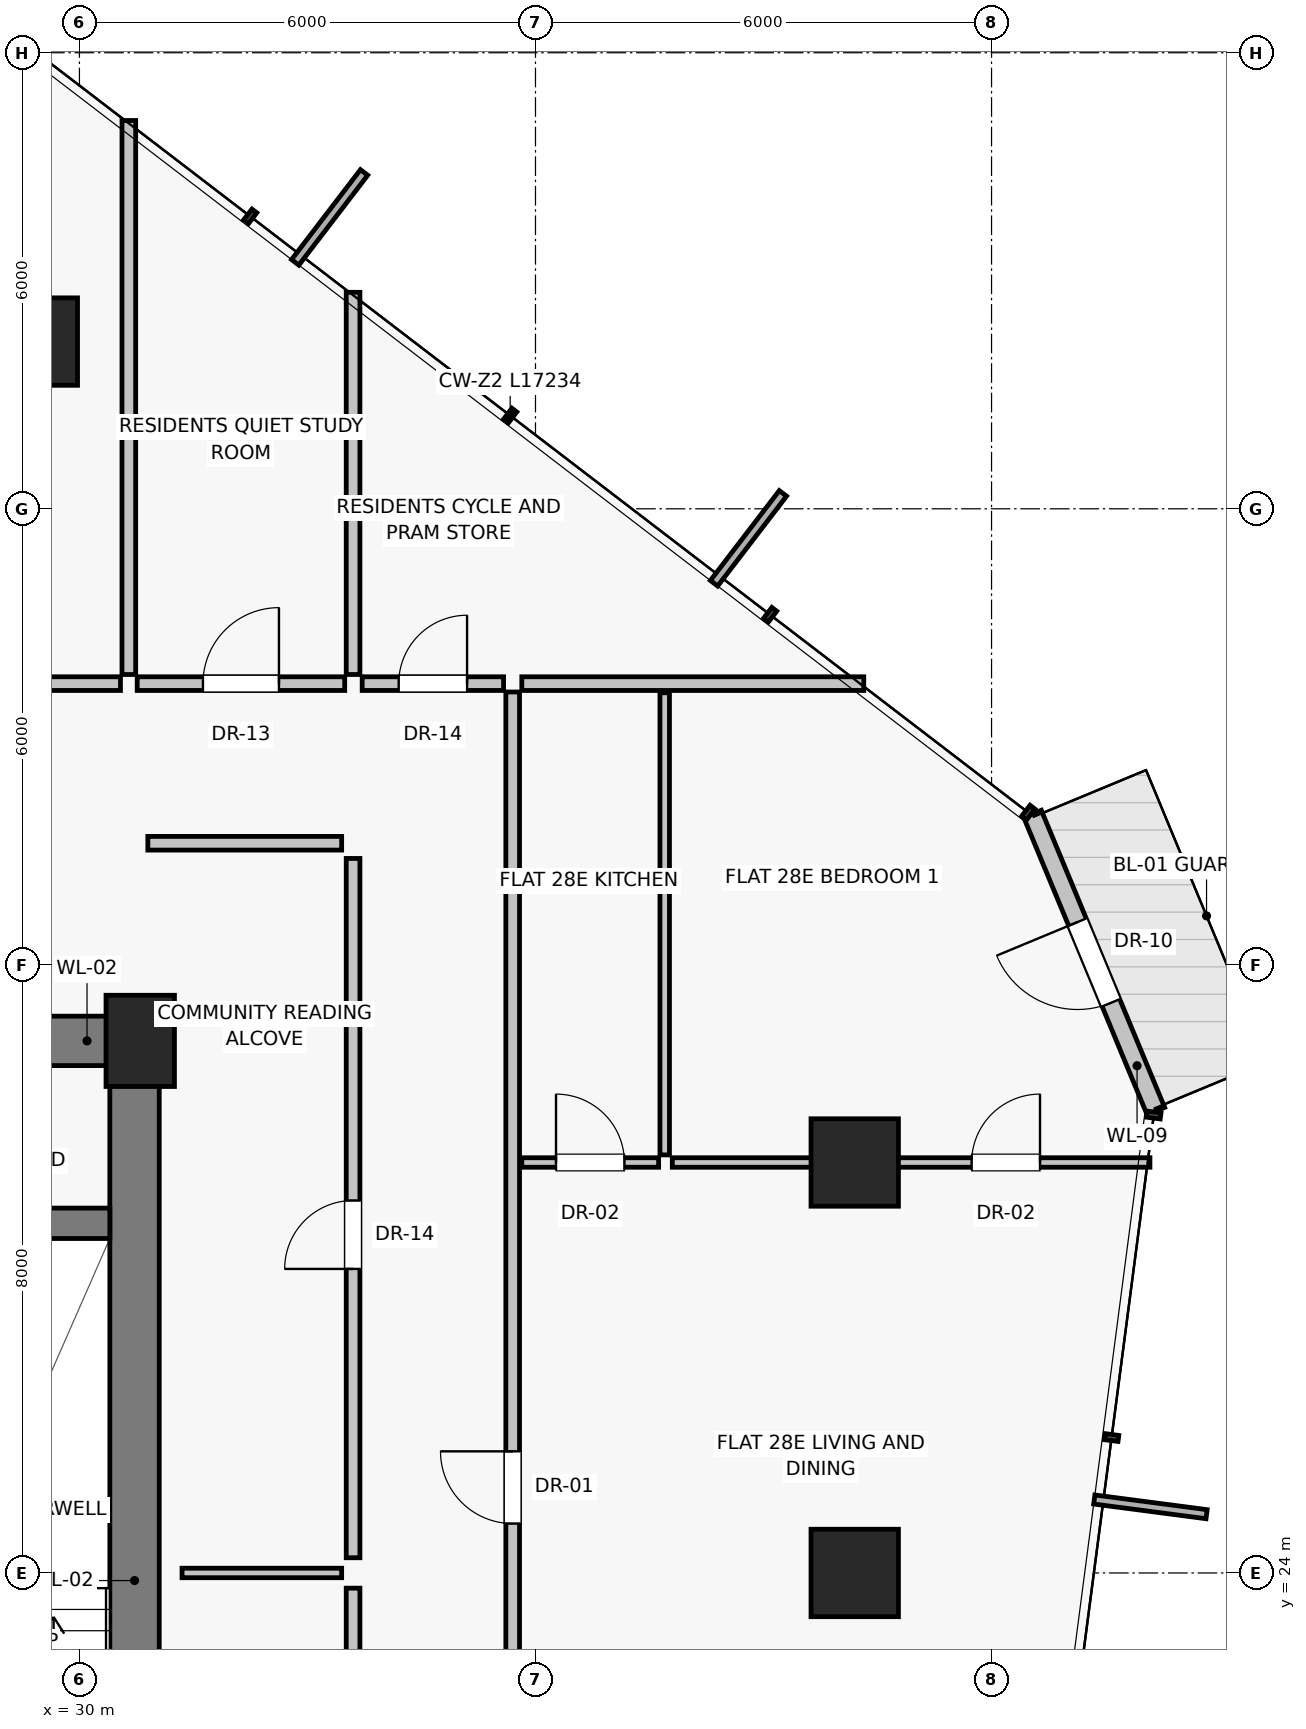
"""IFC4 building model, lengths in metres.
Left out: names, types, materials, properties, quantities, classifications, styles, units other than length and angle.
Written with IfcOpenShell. Run it as: python <this file> out.ifc"""

import sys

from ifc_helpers import new_model, si_unit, direction, frame, frame_2d, origin, origin_2d, place, context, subcontext, project, spatial, rectangle, extrude, source, transform, mapped, element, fill, save


model = new_model("IFC4")
c1 = context("Model", 3, precision=1e-05, world=origin(), true_north=direction((0.0, 1.0)))
c2 = subcontext(c1, "Body", "Model", "MODEL_VIEW")
j1 = project(units=[si_unit("LENGTHUNIT", "METRE"), si_unit("PLANEANGLEUNIT", "RADIAN")], contexts=[c1])
p1 = place(None, origin())
s1 = spatial("IfcSite", under=j1, at=p1, CompositionType="ELEMENT")
p2 = place(p1, origin())
s2 = spatial("IfcBuilding", under=s1, at=p2, CompositionType="ELEMENT")
p3 = place(p2, frame((0.0, 0.0, 102.45)))
s3 = spatial("IfcBuildingStorey", under=s2, at=p3, CompositionType="ELEMENT", Elevation=102.45)
p4 = place(p3, frame((30.8, 31.0, 0.0), z_axis=(0.0, 0.0, 1.0), x_axis=(1.0, 0.0, 0.0)))
e1 = element("IfcColumn", 1, at=p4, inside=s3, PredefinedType="PILASTER", context=c2, shape_type="SweptSolid", body=[
    extrude(rectangle(XDim=0.9, YDim=1.2, at=origin_2d()), origin(), (0.0, 0.0, 1.0), 3.25),
])
for number, where, z_axis, x_axis in (
    (2, (40.2, 24.0, 0.0), (0.0, 0.0, 1.0), (1.0, 0.0, 0.0)),
    (3, (40.2, 29.4, 0.0), (0.0, 0.0, 1.0), (1.0, 0.0, 0.0)),
    (4, (29.4, 40.2, 0.0), (0.0, 0.0, 1.0), (1.0, 0.0, 0.0)),
):
    element("IfcColumn", number, at=place(p3, frame(where, z_axis=z_axis, x_axis=x_axis)), inside=s3, PredefinedType="COLUMN", context=c2, shape_type="SweptSolid", body=[
        extrude(rectangle(XDim=1.15, YDim=1.15, at=origin_2d()), origin(), (0.0, 0.0, 1.0), 3.25),
    ])
p5 = place(p3, frame((44.162, 30.076, 0.0), z_axis=(0.0, 0.0, 1.0), x_axis=(-0.383361891247, 0.923598213694, 0.0)))
e5 = element("IfcWall", 5, at=p5, inside=s3, PredefinedType="SOLIDWALL", context=c2, shape_type="SweptSolid", body=[
    extrude(rectangle(XDim=4.233, YDim=0.25, at=frame_2d((2.117, 0.0))), origin(), (0.0, 0.0, 1.0), 3.0),
])
p6 = place(p5, frame((1.542, 0.0, 0.0)))
e6 = element("IfcOpeningElement", 6, at=p6, cuts=e5, PredefinedType="OPENING", context=c2, shape_type="SweptSolid", body=[
    extrude(rectangle(XDim=1.15, YDim=2.25, at=frame_2d((0.575, 1.125))), frame((0.0, 0.135, 0.0), z_axis=(0.0, -1.0, 0.0), x_axis=(1.0, 0.0, 0.0)), (0.0, 0.0, 1.0), 0.27),
])
p7 = place(p3, frame((30.725, 16.8, 0.0), z_axis=(0.0, 0.0, 1.0), x_axis=(0.0, 1.0, 0.0)))
e7 = element("IfcWall", 7, at=p7, inside=s3, PredefinedType="SHEAR", context=c2, shape_type="SweptSolid", body=[
    extrude(rectangle(XDim=14.2, YDim=0.65, at=frame_2d((7.1, 0.0))), origin(), (0.0, 0.0, 1.0), 3.0),
])
p8 = place(p3, frame((27.0, 31.0, 0.0), z_axis=(0.0, 0.0, 1.0), x_axis=(1.0, 0.0, 0.0)))
e8 = element("IfcWall", 8, at=p8, inside=s3, PredefinedType="SHEAR", context=c2, shape_type="SweptSolid", body=[
    extrude(rectangle(XDim=3.8, YDim=0.65, at=frame_2d((1.9, 0.0))), origin(), (0.0, 0.0, 1.0), 3.0),
])
p9 = place(p8, frame((1.15, 0.0, 0.0)))
e9 = element("IfcOpeningElement", 9, at=p9, cuts=e8, PredefinedType="OPENING", context=c2, shape_type="SweptSolid", body=[
    extrude(rectangle(XDim=1.0, YDim=2.01, at=frame_2d((0.5, 1.005))), frame((0.0, 0.335, 0.0), z_axis=(0.0, -1.0, 0.0), x_axis=(1.0, 0.0, 0.0)), (0.0, 0.0, 1.0), 0.67),
])
p10 = place(p3, frame((27.0, 28.6, 0.0), z_axis=(0.0, 0.0, 1.0), x_axis=(1.0, 0.0, 0.0)))
e10 = element("IfcWall", 10, at=p10, inside=s3, PredefinedType="SHEAR", context=c2, shape_type="SweptSolid", body=[
    extrude(rectangle(XDim=3.4, YDim=0.4, at=frame_2d((1.7, 0.0))), origin(), (0.0, 0.0, 1.0), 3.0),
])
p11 = place(p3, frame((33.6, 14.4, 0.0), z_axis=(0.0, 0.0, 1.0), x_axis=(0.0, 1.0, 0.0)))
e11 = element("IfcWall", 11, at=p11, inside=s3, PredefinedType="PARTITIONING", context=c2, shape_type="SweptSolid", body=[
    extrude(rectangle(XDim=9.4, YDim=0.18, at=frame_2d((4.7, 0.0))), origin(), (0.0, 0.0, 1.0), 3.0),
])
p12 = place(p11, frame((3.8, 0.0, 0.0)))
e12 = element("IfcOpeningElement", 12, at=p12, cuts=e11, PredefinedType="OPENING", context=c2, shape_type="SweptSolid", body=[
    extrude(rectangle(XDim=0.9, YDim=2.01, at=frame_2d((0.45, 1.005))), frame((0.0, 0.1, 0.0), z_axis=(0.0, -1.0, 0.0), x_axis=(1.0, 0.0, 0.0)), (0.0, 0.0, 1.0), 0.2),
])
p13 = place(p3, frame((33.6, 24.2, 0.0), z_axis=(0.0, 0.0, 1.0), x_axis=(0.0, 1.0, 0.0)))
e13 = element("IfcWall", 13, at=p13, inside=s3, PredefinedType="PARTITIONING", context=c2, shape_type="SweptSolid", body=[
    extrude(rectangle(XDim=9.2, YDim=0.18, at=frame_2d((4.6, 0.0))), origin(), (0.0, 0.0, 1.0), 3.0),
])
p14 = place(p13, frame((3.8, 0.0, 0.0)))
e14 = element("IfcOpeningElement", 14, at=p14, cuts=e13, PredefinedType="OPENING", context=c2, shape_type="SweptSolid", body=[
    extrude(rectangle(XDim=0.9, YDim=2.01, at=frame_2d((0.45, 1.005))), frame((0.0, 0.1, 0.0), z_axis=(0.0, -1.0, 0.0), x_axis=(1.0, 0.0, 0.0)), (0.0, 0.0, 1.0), 0.2),
])
p15 = place(p3, frame((31.35, 24.0, 0.0), z_axis=(0.0, 0.0, 1.0), x_axis=(1.0, 0.0, 0.0)))
e15 = element("IfcWall", 15, at=p15, inside=s3, PredefinedType="PARTITIONING", context=c2, shape_type="SweptSolid", body=[
    extrude(rectangle(XDim=2.1, YDim=0.125, at=frame_2d((1.05, 0.0))), origin(), (0.0, 0.0, 1.0), 3.0),
])
p16 = place(p3, frame((30.9, 33.6, 0.0), z_axis=(0.0, 0.0, 1.0), x_axis=(1.0, 0.0, 0.0)))
e16 = element("IfcWall", 16, at=p16, inside=s3, PredefinedType="PARTITIONING", context=c2, shape_type="SweptSolid", body=[
    extrude(rectangle(XDim=2.55, YDim=0.18, at=frame_2d((1.275, 0.0))), origin(), (0.0, 0.0, 1.0), 3.0),
])
p17 = place(p3, frame((33.6, 35.82, 0.0), z_axis=(0.0, 0.0, 1.0), x_axis=(0.0, 1.0, 0.0)))
e17 = element("IfcWall", 17, at=p17, inside=s3, PredefinedType="PARTITIONING", context=c2, shape_type="SweptSolid", body=[
    extrude(rectangle(XDim=5.028, YDim=0.18, at=frame_2d((2.514, 0.0))), origin(), (0.0, 0.0, 1.0), 3.0),
])
p18 = place(p3, frame((30.76, 35.7, 0.0), z_axis=(0.0, 0.0, 1.0), x_axis=(1.0, 0.0, 0.0)))
e18 = element("IfcWall", 18, at=p18, inside=s3, PredefinedType="PARTITIONING", context=c2, shape_type="SweptSolid", body=[
    extrude(rectangle(XDim=2.73, YDim=0.18, at=frame_2d((1.365, 0.0))), origin(), (0.0, 0.0, 1.0), 3.0),
])
p19 = place(p18, frame((0.865, 0.0, 0.0)))
e19 = element("IfcOpeningElement", 19, at=p19, cuts=e18, PredefinedType="OPENING", context=c2, shape_type="SweptSolid", body=[
    extrude(rectangle(XDim=1.0, YDim=2.01, at=frame_2d((0.5, 1.005))), frame((0.0, 0.1, 0.0), z_axis=(0.0, -1.0, 0.0), x_axis=(1.0, 0.0, 0.0)), (0.0, 0.0, 1.0), 0.2),
])
p20 = place(p3, frame((30.65, 35.82, 0.0), z_axis=(0.0, 0.0, 1.0), x_axis=(0.0, 1.0, 0.0)))
e20 = element("IfcWall", 20, at=p20, inside=s3, PredefinedType="PARTITIONING", context=c2, shape_type="SweptSolid", body=[
    extrude(rectangle(XDim=7.288, YDim=0.18, at=frame_2d((3.644, 0.0))), origin(), (0.0, 0.0, 1.0), 3.0),
])
p21 = place(p3, frame((25.366, 35.7, 0.0), z_axis=(0.0, 0.0, 1.0), x_axis=(1.0, 0.0, 0.0)))
e21 = element("IfcWall", 21, at=p21, inside=s3, PredefinedType="PARTITIONING", context=c2, shape_type="SweptSolid", body=[
    extrude(rectangle(XDim=5.174, YDim=0.18, at=frame_2d((2.587, 0.0))), origin(), (0.0, 0.0, 1.0), 2.58),
])
p22 = place(p21, frame((3.03, 0.0, 0.0)))
e22 = element("IfcOpeningElement", 22, at=p22, cuts=e21, PredefinedType="OPENING", context=c2, shape_type="SweptSolid", body=[
    extrude(rectangle(XDim=0.95, YDim=2.02, at=frame_2d((0.475, 1.01))), frame((0.0, 0.1, 0.0), z_axis=(0.0, -1.0, 0.0), x_axis=(1.0, 0.0, 0.0)), (0.0, 0.0, 1.0), 0.2),
])
p23 = place(p3, frame((35.82, 35.7, 0.0), z_axis=(0.0, 0.0, 1.0), x_axis=(1.0, 0.0, 0.0)))
e23 = element("IfcWall", 23, at=p23, inside=s3, PredefinedType="PARTITIONING", context=c2, shape_type="SweptSolid", body=[
    extrude(rectangle(XDim=4.499, YDim=0.18, at=frame_2d((2.25, 0.0))), origin(), (0.0, 0.0, 1.0), 3.0),
])
p24 = place(p3, frame((35.7, 18.71, 0.0), z_axis=(0.0, 0.0, 1.0), x_axis=(0.0, 1.0, 0.0)))
e24 = element("IfcWall", 24, at=p24, inside=s3, PredefinedType="PARTITIONING", context=c2, shape_type="SweptSolid", body=[
    extrude(rectangle(XDim=16.88, YDim=0.18, at=frame_2d((8.44, 0.0))), origin(), (0.0, 0.0, 1.0), 2.58),
])
p25 = place(p24, frame((5.94, 0.0, 0.0)))
e25 = element("IfcOpeningElement", 25, at=p25, cuts=e24, PredefinedType="OPENING", context=c2, shape_type="SweptSolid", body=[
    extrude(rectangle(XDim=0.95, YDim=2.02, at=frame_2d((0.475, 1.01))), frame((0.0, 0.1, 0.0), z_axis=(0.0, -1.0, 0.0), x_axis=(1.0, 0.0, 0.0)), (0.0, 0.0, 1.0), 0.2),
])
p26 = place(p3, frame((35.82, 29.4, 0.0), z_axis=(0.0, 0.0, 1.0), x_axis=(1.0, 0.0, 0.0)))
e26 = element("IfcWall", 26, at=p26, inside=s3, PredefinedType="PARTITIONING", context=c2, shape_type="SweptSolid", body=[
    extrude(rectangle(XDim=1.8, YDim=0.125, at=frame_2d((0.9, 0.0))), origin(), (0.0, 0.0, 1.0), 2.378),
])
p27 = place(p26, frame((0.45, 0.0, 0.0)))
e27 = element("IfcOpeningElement", 27, at=p27, cuts=e26, PredefinedType="OPENING", context=c2, shape_type="SweptSolid", body=[
    extrude(rectangle(XDim=0.9, YDim=2.01, at=frame_2d((0.45, 1.005))), frame((0.0, 0.073, 0.0), z_axis=(0.0, -1.0, 0.0), x_axis=(1.0, 0.0, 0.0)), (0.0, 0.0, 1.0), 0.145),
])
p28 = place(p3, frame((37.7, 29.5, 0.0), z_axis=(0.0, 0.0, 1.0), x_axis=(0.0, 1.0, 0.0)))
e28 = element("IfcWall", 28, at=p28, inside=s3, PredefinedType="PARTITIONING", context=c2, shape_type="SweptSolid", body=[
    extrude(rectangle(XDim=6.08, YDim=0.125, at=frame_2d((3.04, 0.0))), origin(), (0.0, 0.0, 1.0), 3.0),
])
p29 = place(p3, frame((37.8, 29.4, 0.0), z_axis=(0.0, 0.0, 1.0), x_axis=(1.0, 0.0, 0.0)))
e29 = element("IfcWall", 29, at=p29, inside=s3, PredefinedType="PARTITIONING", context=c2, shape_type="SweptSolid", body=[
    extrude(rectangle(XDim=6.283, YDim=0.125, at=frame_2d((3.142, 0.0))), origin(), (0.0, 0.0, 1.0), 2.378),
])
p30 = place(p29, frame((3.938, 0.0, 0.0)))
e30 = element("IfcOpeningElement", 30, at=p30, cuts=e29, PredefinedType="OPENING", context=c2, shape_type="SweptSolid", body=[
    extrude(rectangle(XDim=0.9, YDim=2.01, at=frame_2d((0.45, 1.005))), frame((0.0, 0.073, 0.0), z_axis=(0.0, -1.0, 0.0), x_axis=(1.0, 0.0, 0.0)), (0.0, 0.0, 1.0), 0.145),
])
p31 = place(p3, frame((33.72, 35.7, 0.0), z_axis=(0.0, 0.0, 1.0), x_axis=(1.0, 0.0, 0.0)))
e31 = element("IfcWall", 31, at=p31, inside=s3, PredefinedType="PARTITIONING", context=c2, shape_type="SweptSolid", body=[
    extrude(rectangle(XDim=1.86, YDim=0.18, at=frame_2d((0.93, 0.0))), origin(), (0.0, 0.0, 1.0), 3.0),
])
p32 = place(p31, frame((0.48, 0.0, 0.0)))
e32 = element("IfcOpeningElement", 32, at=p32, cuts=e31, PredefinedType="OPENING", context=c2, shape_type="SweptSolid", body=[
    extrude(rectangle(XDim=0.9, YDim=2.01, at=frame_2d((0.45, 1.005))), frame((0.0, 0.1, 0.0), z_axis=(0.0, -1.0, 0.0), x_axis=(1.0, 0.0, 0.0)), (0.0, 0.0, 1.0), 0.2),
])
m1 = source(origin(), c2, "Body", "SweptSolid", [
    extrude(rectangle(XDim=1.15, YDim=2.25, at=frame_2d((0.575, 1.125))), frame((0.0, 0.025, 0.0), z_axis=(0.0, -1.0, 0.0), x_axis=(1.0, 0.0, 0.0)), (0.0, 0.0, 1.0), 0.05),
])
p33 = place(p6, frame((1.15, 0.0, 0.0), z_axis=(0.0, 0.0, 1.0), x_axis=(-1.0, 0.0, 0.0)))
e33 = element("IfcDoor", 33, at=p33, inside=s3, OperationType="SINGLE_SWING_RIGHT", PredefinedType="DOOR", context=c2, shape_type="MappedRepresentation", body=[
    mapped(m1, transform((0.0, 0.0, 0.0), scale=1.0)),
])
fill(e6, e33)
m2 = source(origin(), c2, "Body", "SweptSolid", [
    extrude(rectangle(XDim=0.9, YDim=2.01, at=frame_2d((0.45, 1.005))), frame((0.0, 0.025, 0.0), z_axis=(0.0, -1.0, 0.0), x_axis=(1.0, 0.0, 0.0)), (0.0, 0.0, 1.0), 0.05),
])
p34 = place(p14, origin())
e34 = element("IfcDoor", 34, at=p34, inside=s3, OperationType="SINGLE_SWING_LEFT", PredefinedType="DOOR", context=c2, shape_type="MappedRepresentation", body=[
    mapped(m2, transform((0.0, 0.0, 0.0), scale=1.0)),
])
fill(e14, e34)
m3 = source(origin(), c2, "Body", "SweptSolid", [
    extrude(rectangle(XDim=1.0, YDim=2.01, at=frame_2d((0.5, 1.005))), frame((0.0, 0.025, 0.0), z_axis=(0.0, -1.0, 0.0), x_axis=(1.0, 0.0, 0.0)), (0.0, 0.0, 1.0), 0.05),
])
p35 = place(p19, origin())
e35 = element("IfcDoor", 35, at=p35, inside=s3, OperationType="SINGLE_SWING_RIGHT", PredefinedType="DOOR", context=c2, shape_type="MappedRepresentation", body=[
    mapped(m3, transform((0.0, 0.0, 0.0), scale=1.0)),
])
fill(e19, e35)
m4 = source(origin(), c2, "Body", "SweptSolid", [
    extrude(rectangle(XDim=0.95, YDim=2.02, at=frame_2d((0.475, 1.01))), frame((0.0, 0.025, 0.0), z_axis=(0.0, -1.0, 0.0), x_axis=(1.0, 0.0, 0.0)), (0.0, 0.0, 1.0), 0.05),
])
p36 = place(p25, origin())
e36 = element("IfcDoor", 36, at=p36, inside=s3, OperationType="SINGLE_SWING_RIGHT", PredefinedType="DOOR", context=c2, shape_type="MappedRepresentation", body=[
    mapped(m4, transform((0.0, 0.0, 0.0), scale=1.0)),
])
fill(e25, e36)
p37 = place(p27, origin())
e37 = element("IfcDoor", 37, at=p37, inside=s3, OperationType="SINGLE_SWING_LEFT", PredefinedType="DOOR", context=c2, shape_type="MappedRepresentation", body=[
    mapped(m2, transform((0.0, 0.0, 0.0), scale=1.0)),
])
fill(e27, e37)
p38 = place(p30, origin())
e38 = element("IfcDoor", 38, at=p38, inside=s3, OperationType="SINGLE_SWING_RIGHT", PredefinedType="DOOR", context=c2, shape_type="MappedRepresentation", body=[
    mapped(m2, transform((0.0, 0.0, 0.0), scale=1.0)),
])
fill(e30, e38)
p39 = place(p32, origin())
e39 = element("IfcDoor", 39, at=p39, inside=s3, OperationType="SINGLE_SWING_RIGHT", PredefinedType="DOOR", context=c2, shape_type="MappedRepresentation", body=[
    mapped(m2, transform((0.0, 0.0, 0.0), scale=1.0)),
])
fill(e32, e39)
save(model, sys.argv[1])
